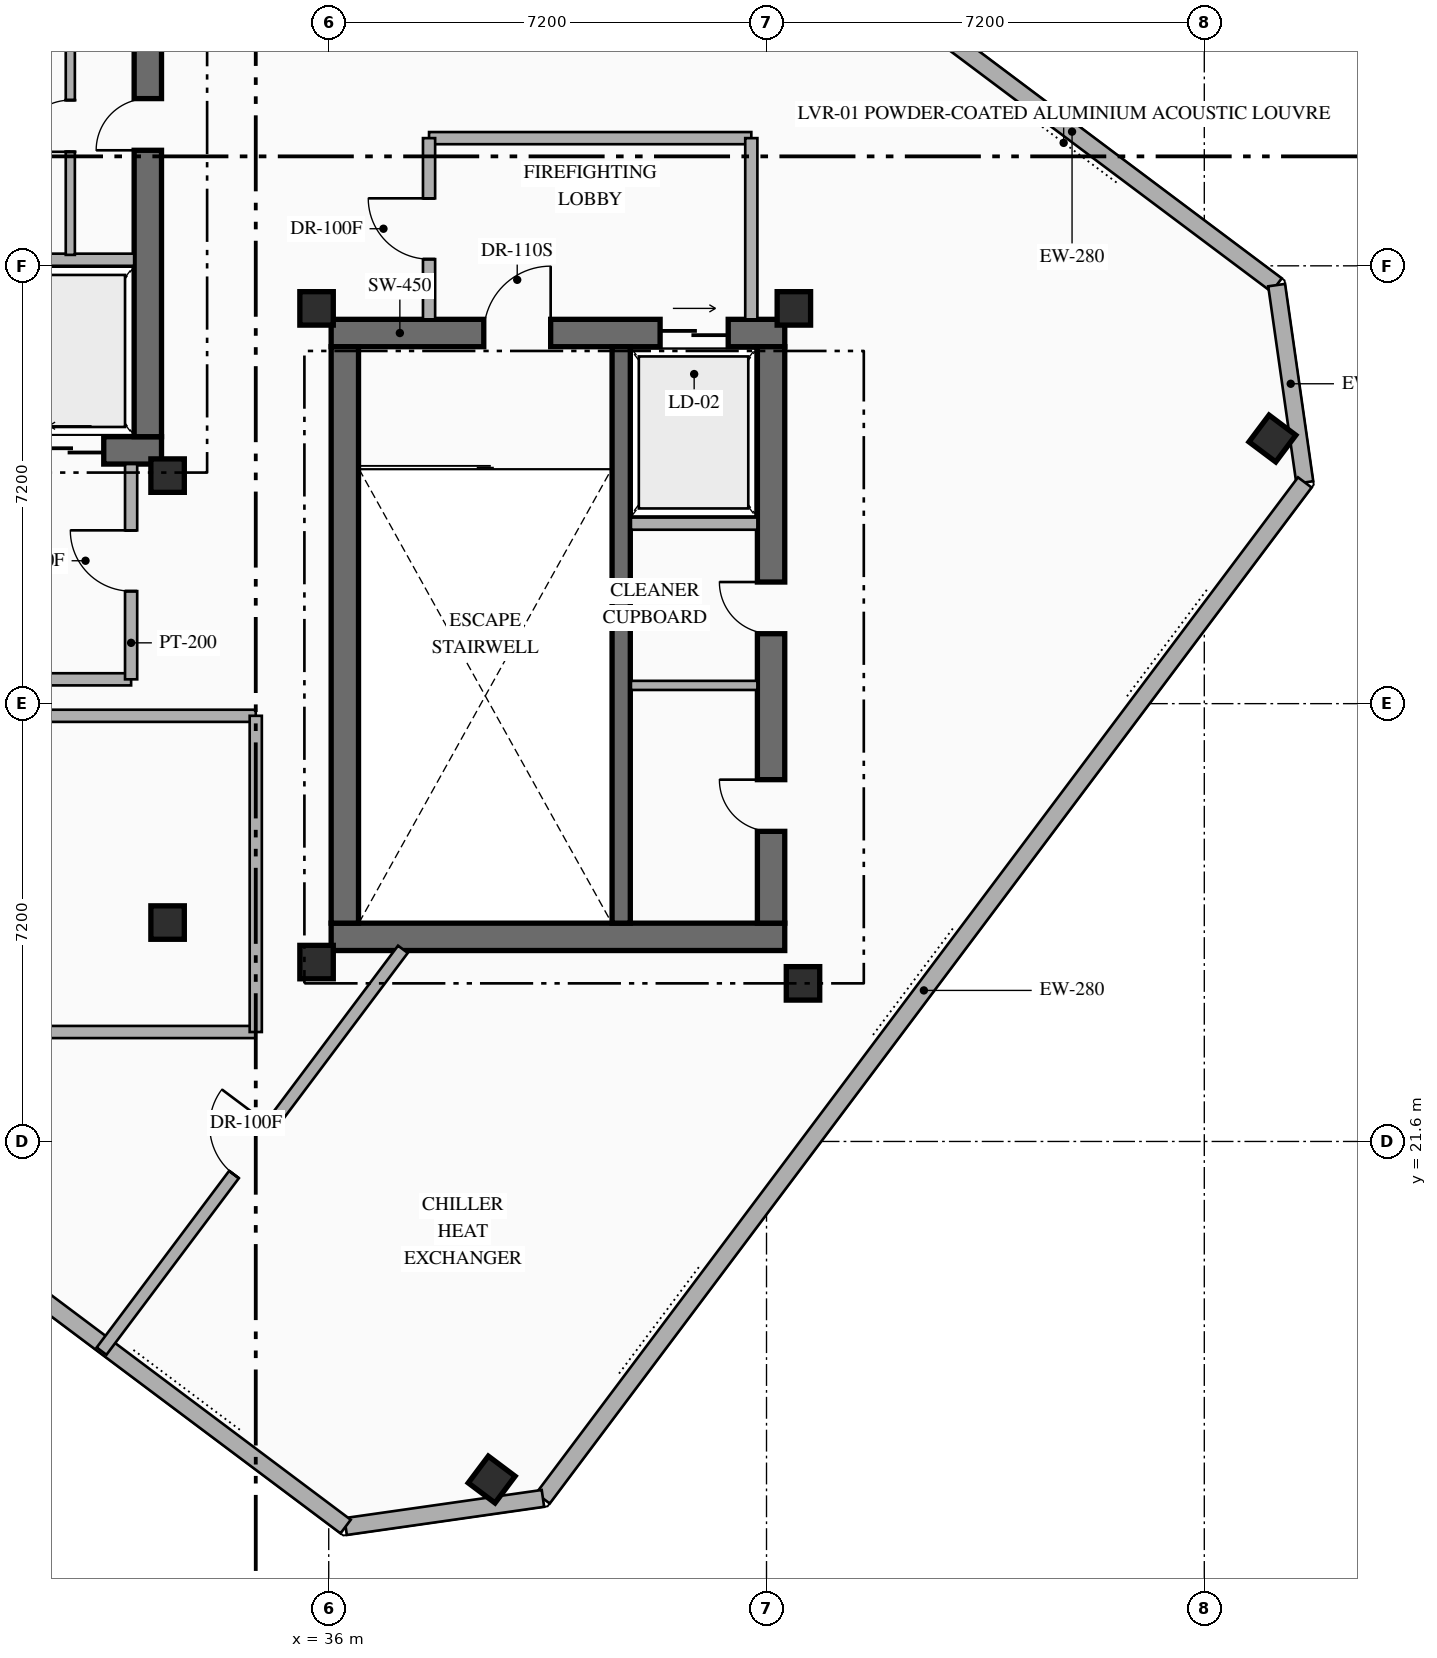
"""IFC4 building model, lengths in metres.
Left out: names, types, materials, properties, quantities, classifications, styles, units other than length and angle.
Written with IfcOpenShell. Run it as: python <this file> out.ifc"""

import sys

from ifc_helpers import new_model, si_unit, direction, frame, frame_2d, origin, origin_2d, place, context, subcontext, project, spatial, rectangle, hollow_rectangle, extrude, element, fill, save


model = new_model("IFC4")
c1 = context("Model", 3, precision=1e-05, world=origin(), true_north=direction((0.0, 1.0)))
c2 = subcontext(c1, "Body", "Model", "MODEL_VIEW")
j1 = project(units=[si_unit("LENGTHUNIT", "METRE"), si_unit("PLANEANGLEUNIT", "RADIAN")], contexts=[c1])
p1 = place(None, origin())
s1 = spatial("IfcSite", under=j1, at=p1, CompositionType="ELEMENT")
p2 = place(p1, origin())
s2 = spatial("IfcBuilding", under=s1, at=p2, CompositionType="ELEMENT")
p3 = place(p2, frame((0.0, 0.0, 289.95)))
s3 = spatial("IfcBuildingStorey", under=s2, at=p3, CompositionType="ELEMENT", Elevation=289.95)
p4 = place(p3, frame((25.77, 32.965, 0.0), z_axis=(0.0, 0.0, 1.0), x_axis=(1.0, 0.0, 0.0)))
e1 = element("IfcWall", 1, at=p4, inside=s3, PredefinedType="SHEAR", context=c2, shape_type="SweptSolid", body=[
    extrude(rectangle(XDim=7.48, YDim=0.45, at=frame_2d((3.74, 0.0))), origin(), (0.0, 0.0, 1.0), 4.2),
])
p5 = place(p4, frame((2.68, 0.0, 0.0)))
e2 = element("IfcOpeningElement", 2, at=p5, cuts=e1, PredefinedType="OPENING", context=c2, shape_type="SweptSolid", body=[
    extrude(rectangle(XDim=1.1, YDim=2.2, at=frame_2d((0.55, 1.1))), frame((0.0, 0.235, 0.0), z_axis=(0.0, -1.0, 0.0), x_axis=(1.0, 0.0, 0.0)), (0.0, 0.0, 1.0), 0.47),
])
p6 = place(p4, frame((5.43, 0.0, 0.0)))
e3 = element("IfcOpeningElement", 3, at=p6, cuts=e1, PredefinedType="OPENING", context=c2, shape_type="SweptSolid", body=[
    extrude(rectangle(XDim=1.1, YDim=2.15, at=frame_2d((0.55, 1.075))), frame((0.0, 0.235, 0.0), z_axis=(0.0, -1.0, 0.0), x_axis=(1.0, 0.0, 0.0)), (0.0, 0.0, 1.0), 0.47),
])
p7 = place(p3, frame((33.025, 33.19, 0.0), z_axis=(0.0, 0.0, 1.0), x_axis=(0.0, 1.0, 0.0)))
e4 = element("IfcWall", 4, at=p7, inside=s3, PredefinedType="SHEAR", context=c2, shape_type="SweptSolid", body=[
    extrude(rectangle(XDim=9.48, YDim=0.45, at=frame_2d((4.74, 0.0))), origin(), (0.0, 0.0, 1.0), 4.2),
])
p8 = place(p7, frame((4.71, 0.0, 0.0)))
e5 = element("IfcOpeningElement", 5, at=p8, cuts=e4, PredefinedType="OPENING", context=c2, shape_type="SweptSolid", body=[
    extrude(rectangle(XDim=0.85, YDim=2.08, at=frame_2d((0.425, 1.04))), frame((0.0, 0.235, 0.0), z_axis=(0.0, -1.0, 0.0), x_axis=(1.0, 0.0, 0.0)), (0.0, 0.0, 1.0), 0.47),
])
p9 = place(p7, frame((7.76, 0.0, 0.0)))
e6 = element("IfcOpeningElement", 6, at=p9, cuts=e4, PredefinedType="OPENING", context=c2, shape_type="SweptSolid", body=[
    extrude(rectangle(XDim=0.85, YDim=2.08, at=frame_2d((0.425, 1.04))), frame((0.0, 0.235, 0.0), z_axis=(0.0, -1.0, 0.0), x_axis=(1.0, 0.0, 0.0)), (0.0, 0.0, 1.0), 0.47),
])
p10 = place(p3, frame((36.04, 24.965, 0.0), z_axis=(0.0, 0.0, 1.0), x_axis=(1.0, 0.0, 0.0)))
e7 = element("IfcWall", 7, at=p10, inside=s3, PredefinedType="SHEAR", context=c2, shape_type="SweptSolid", body=[
    extrude(rectangle(XDim=7.46, YDim=0.45, at=frame_2d((3.73, 0.0))), origin(), (0.0, 0.0, 1.0), 4.2),
])
p11 = place(p3, frame((36.04, 34.895, 0.0), z_axis=(0.0, 0.0, 1.0), x_axis=(1.0, 0.0, 0.0)))
e8 = element("IfcWall", 8, at=p11, inside=s3, PredefinedType="SHEAR", context=c2, shape_type="SweptSolid", body=[
    extrude(rectangle(XDim=7.46, YDim=0.45, at=frame_2d((3.73, 0.0))), origin(), (0.0, 0.0, 1.0), 4.2),
])
p12 = place(p11, frame((2.51, 0.0, 0.0)))
e9 = element("IfcOpeningElement", 9, at=p12, cuts=e8, PredefinedType="OPENING", context=c2, shape_type="SweptSolid", body=[
    extrude(rectangle(XDim=1.1, YDim=2.2, at=frame_2d((0.55, 1.1))), frame((0.0, 0.235, 0.0), z_axis=(0.0, -1.0, 0.0), x_axis=(1.0, 0.0, 0.0)), (0.0, 0.0, 1.0), 0.47),
])
p13 = place(p11, frame((5.41, 0.0, 0.0)))
e10 = element("IfcOpeningElement", 10, at=p13, cuts=e8, PredefinedType="OPENING", context=c2, shape_type="SweptSolid", body=[
    extrude(rectangle(XDim=1.12, YDim=2.15, at=frame_2d((0.56, 1.075))), frame((0.0, 0.235, 0.0), z_axis=(0.0, -1.0, 0.0), x_axis=(1.0, 0.0, 0.0)), (0.0, 0.0, 1.0), 0.47),
])
p14 = place(p3, frame((36.265, 25.19, 0.0), z_axis=(0.0, 0.0, 1.0), x_axis=(0.0, 1.0, 0.0)))
e11 = element("IfcWall", 11, at=p14, inside=s3, PredefinedType="SHEAR", context=c2, shape_type="SweptSolid", body=[
    extrude(rectangle(XDim=9.48, YDim=0.45, at=frame_2d((4.74, 0.0))), origin(), (0.0, 0.0, 1.0), 4.2),
])
p15 = place(p3, frame((43.275, 25.19, 0.0), z_axis=(0.0, 0.0, 1.0), x_axis=(0.0, 1.0, 0.0)))
e12 = element("IfcWall", 12, at=p15, inside=s3, PredefinedType="SHEAR", context=c2, shape_type="SweptSolid", body=[
    extrude(rectangle(XDim=9.48, YDim=0.45, at=frame_2d((4.74, 0.0))), origin(), (0.0, 0.0, 1.0), 4.2),
])
p16 = place(p15, frame((1.51, 0.0, 0.0)))
e13 = element("IfcOpeningElement", 13, at=p16, cuts=e12, PredefinedType="OPENING", context=c2, shape_type="SweptSolid", body=[
    extrude(rectangle(XDim=0.85, YDim=2.08, at=frame_2d((0.425, 1.04))), frame((0.0, 0.235, 0.0), z_axis=(0.0, -1.0, 0.0), x_axis=(1.0, 0.0, 0.0)), (0.0, 0.0, 1.0), 0.47),
])
p17 = place(p15, frame((4.76, 0.0, 0.0)))
e14 = element("IfcOpeningElement", 14, at=p17, cuts=e12, PredefinedType="OPENING", context=c2, shape_type="SweptSolid", body=[
    extrude(rectangle(XDim=0.85, YDim=2.08, at=frame_2d((0.425, 1.04))), frame((0.0, 0.235, 0.0), z_axis=(0.0, -1.0, 0.0), x_axis=(1.0, 0.0, 0.0)), (0.0, 0.0, 1.0), 0.47),
])
p18 = place(p3, frame((40.81, 25.19, 0.0), z_axis=(0.0, 0.0, 1.0), x_axis=(0.0, 1.0, 0.0)))
e15 = element("IfcWall", 15, at=p18, inside=s3, PredefinedType="SHEAR", context=c2, shape_type="SweptSolid", body=[
    extrude(rectangle(XDim=9.48, YDim=0.3, at=frame_2d((4.74, 0.0))), origin(), (0.0, 0.0, 1.0), 4.2),
])
for number, where, z_axis, x_axis in (
    (16, (33.35, 32.55, 0.0), (0.0, 0.0, 1.0), (1.0, 0.0, 0.0)),
    (17, (35.8, 24.55, 0.0), (0.0, 0.0, 1.0), (1.0, 0.0, 0.0)),
    (18, (43.8, 24.2, 0.0), (0.0, 0.0, 1.0), (1.0, 0.0, 0.0)),
    (19, (35.8, 35.3, 0.0), (0.0, 0.0, 1.0), (1.0, 0.0, 0.0)),
    (20, (43.65, 35.3, 0.0), (0.0, 0.0, 1.0), (1.0, 0.0, 0.0)),
    (21, (33.35, 25.2, 0.0), (0.0, 0.0, 1.0), (1.0, 0.0, 0.0)),
    (22, (38.68, 16.04, 0.0), (0.0, 0.0, 1.0), (0.8, -0.6, 0.0)),
    (23, (51.52, 33.16, 0.0), (0.0, 0.0, 1.0), (0.8, -0.6, 0.0)),
):
    element("IfcColumn", number, at=place(p3, frame(where, z_axis=z_axis, x_axis=x_axis)), inside=s3, PredefinedType="COLUMN", context=c2, shape_type="SweptSolid", body=[
        extrude(hollow_rectangle(XDim=0.55, YDim=0.55, WallThickness=0.022, at=origin_2d()), origin(), (0.0, 0.0, 1.0), 3.818),
    ])
p19 = place(p3, frame((44.86, 40.73, 0.0), z_axis=(0.0, 0.0, 1.0), x_axis=(0.800034825678, -0.599953562955, 0.0)))
e24 = element("IfcWall", 24, at=p19, inside=s3, PredefinedType="STANDARD", context=c2, shape_type="SweptSolid", body=[
    extrude(rectangle(XDim=8.412, YDim=0.28, at=frame_2d((4.206, 0.0))), origin(), (0.0, 0.0, 1.0), 3.85),
])
p20 = place(p3, frame((51.59, 35.683, 0.0), z_axis=(0.0, 0.0, 1.0), x_axis=(0.141212810973, -0.989979263428, 0.0)))
e25 = element("IfcWall", 25, at=p20, inside=s3, PredefinedType="STANDARD", context=c2, shape_type="SweptSolid", body=[
    extrude(rectangle(XDim=3.278, YDim=0.28, at=frame_2d((1.639, 0.0))), origin(), (0.0, 0.0, 1.0), 3.85),
])
p21 = place(p3, frame((52.053, 32.438, 0.0), z_axis=(0.0, 0.0, 1.0), x_axis=(-0.599970072971, -0.800022444397, 0.0)))
e26 = element("IfcWall", 26, at=p21, inside=s3, PredefinedType="STANDARD", context=c2, shape_type="SweptSolid", body=[
    extrude(rectangle(XDim=20.885, YDim=0.28, at=frame_2d((10.442, 0.0))), origin(), (0.0, 0.0, 1.0), 3.85),
])
p22 = place(p3, frame((39.523, 15.73, 0.0), z_axis=(0.0, 0.0, 1.0), x_axis=(-0.989977778067, -0.141223223777, 0.0)))
e27 = element("IfcWall", 27, at=p22, inside=s3, PredefinedType="STANDARD", context=c2, shape_type="SweptSolid", body=[
    extrude(rectangle(XDim=3.278, YDim=0.28, at=frame_2d((1.639, 0.0))), origin(), (0.0, 0.0, 1.0), 3.85),
])
p23 = place(p3, frame((36.278, 15.267, 0.0), z_axis=(0.0, 0.0, 1.0), x_axis=(-0.80001062348, 0.599985835098, 0.0)))
e28 = element("IfcWall", 28, at=p23, inside=s3, PredefinedType="STANDARD", context=c2, shape_type="SweptSolid", body=[
    extrude(rectangle(XDim=13.789, YDim=0.28, at=frame_2d((6.894, 0.0))), origin(), (0.0, 0.0, 1.0), 3.85),
])
p24 = place(p3, frame((30.7, 36.1, 0.0), z_axis=(0.0, 0.0, 1.0), x_axis=(1.0, 0.0, 0.0)))
e29 = element("IfcWall", 29, at=p24, inside=s3, PredefinedType="STANDARD", context=c2, shape_type="SweptSolid", body=[
    extrude(rectangle(XDim=2.1, YDim=0.2, at=frame_2d((1.05, 0.0))), origin(), (0.0, 0.0, 1.0), 3.85),
])
p25 = place(p3, frame((31.75, 36.18, 0.0), z_axis=(0.0, 0.0, 1.0), x_axis=(0.0, 1.0, 0.0)))
e30 = element("IfcWall", 30, at=p25, inside=s3, PredefinedType="PARTITIONING", context=c2, shape_type="SweptSolid", body=[
    extrude(rectangle(XDim=4.24, YDim=0.15, at=frame_2d((2.12, 0.0))), origin(), (0.0, 0.0, 1.0), 3.85),
])
p26 = place(p25, frame((1.695, 0.0, 0.0)))
e31 = element("IfcOpeningElement", 31, at=p26, cuts=e30, PredefinedType="OPENING", context=c2, shape_type="SweptSolid", body=[
    extrude(rectangle(XDim=0.85, YDim=2.08, at=frame_2d((0.425, 1.04))), frame((0.0, 0.085, 0.0), z_axis=(0.0, -1.0, 0.0), x_axis=(1.0, 0.0, 0.0)), (0.0, 0.0, 1.0), 0.17),
])
p27 = place(p3, frame((40.97, 31.76, 0.0), z_axis=(0.0, 0.0, 1.0), x_axis=(1.0, 0.0, 0.0)))
e32 = element("IfcWall", 32, at=p27, inside=s3, PredefinedType="STANDARD", context=c2, shape_type="SweptSolid", body=[
    extrude(rectangle(XDim=2.08, YDim=0.2, at=frame_2d((1.04, 0.0))), origin(), (0.0, 0.0, 1.0), 3.85),
])
p28 = place(p3, frame((40.97, 29.1, 0.0), z_axis=(0.0, 0.0, 1.0), x_axis=(1.0, 0.0, 0.0)))
e33 = element("IfcWall", 33, at=p28, inside=s3, PredefinedType="PARTITIONING", context=c2, shape_type="SweptSolid", body=[
    extrude(rectangle(XDim=2.08, YDim=0.15, at=frame_2d((1.04, 0.0))), origin(), (0.0, 0.0, 1.0), 3.85),
])
p29 = place(p3, frame((27.6, 29.2, 0.0), z_axis=(0.0, 0.0, 1.0), x_axis=(1.0, 0.0, 0.0)))
e34 = element("IfcWall", 34, at=p29, inside=s3, PredefinedType="STANDARD", context=c2, shape_type="SweptSolid", body=[
    extrude(rectangle(XDim=5.15, YDim=0.2, at=frame_2d((2.575, 0.0))), origin(), (0.0, 0.0, 1.0), 3.85),
])
p30 = place(p3, frame((32.75, 29.2, 0.0), z_axis=(0.0, 0.0, 1.0), x_axis=(0.0, 1.0, 0.0)))
e35 = element("IfcWall", 35, at=p30, inside=s3, PredefinedType="STANDARD", context=c2, shape_type="SweptSolid", body=[
    extrude(rectangle(XDim=3.54, YDim=0.2, at=frame_2d((1.77, 0.0))), origin(), (0.0, 0.0, 1.0), 3.85),
])
p31 = place(p30, frame((1.45, 0.0, 0.0)))
e36 = element("IfcOpeningElement", 36, at=p31, cuts=e35, PredefinedType="OPENING", context=c2, shape_type="SweptSolid", body=[
    extrude(rectangle(XDim=1.0, YDim=2.2, at=frame_2d((0.5, 1.1))), frame((0.0, 0.11, 0.0), z_axis=(0.0, -1.0, 0.0), x_axis=(1.0, 0.0, 0.0)), (0.0, 0.0, 1.0), 0.22),
])
p32 = place(p3, frame((37.65, 38.1, 0.0), z_axis=(0.0, 0.0, 1.0), x_axis=(1.0, 0.0, 0.0)))
e37 = element("IfcWall", 37, at=p32, inside=s3, PredefinedType="STANDARD", context=c2, shape_type="SweptSolid", body=[
    extrude(rectangle(XDim=5.3, YDim=0.2, at=frame_2d((2.65, 0.0))), origin(), (0.0, 0.0, 1.0), 3.85),
])
p33 = place(p3, frame((42.95, 35.12, 0.0), z_axis=(0.0, 0.0, 1.0), x_axis=(0.0, 1.0, 0.0)))
e38 = element("IfcWall", 38, at=p33, inside=s3, PredefinedType="STANDARD", context=c2, shape_type="SweptSolid", body=[
    extrude(rectangle(XDim=2.98, YDim=0.2, at=frame_2d((1.49, 0.0))), origin(), (0.0, 0.0, 1.0), 3.85),
])
p34 = place(p3, frame((37.65, 35.12, 0.0), z_axis=(0.0, 0.0, 1.0), x_axis=(0.0, 1.0, 0.0)))
e39 = element("IfcWall", 39, at=p34, inside=s3, PredefinedType="STANDARD", context=c2, shape_type="SweptSolid", body=[
    extrude(rectangle(XDim=2.98, YDim=0.2, at=frame_2d((1.49, 0.0))), origin(), (0.0, 0.0, 1.0), 3.85),
])
p35 = place(p34, frame((0.99, 0.0, 0.0)))
e40 = element("IfcOpeningElement", 40, at=p35, cuts=e39, PredefinedType="OPENING", context=c2, shape_type="SweptSolid", body=[
    extrude(rectangle(XDim=1.0, YDim=2.2, at=frame_2d((0.5, 1.1))), frame((0.0, 0.11, 0.0), z_axis=(0.0, -1.0, 0.0), x_axis=(1.0, 0.0, 0.0)), (0.0, 0.0, 1.0), 0.22),
])
p36 = place(p3, frame((25.267, 23.4, 0.0), z_axis=(0.0, 0.0, 1.0), x_axis=(1.0, 0.0, 0.0)))
e41 = element("IfcWall", 41, at=p36, inside=s3, PredefinedType="STANDARD", context=c2, shape_type="SweptSolid", body=[
    extrude(rectangle(XDim=9.533, YDim=0.2, at=frame_2d((4.767, 0.0))), origin(), (0.0, 0.0, 1.0), 3.85),
])
p37 = place(p3, frame((20.44, 28.6, 0.0), z_axis=(0.0, 0.0, 1.0), x_axis=(1.0, 0.0, 0.0)))
e42 = element("IfcWall", 42, at=p37, inside=s3, PredefinedType="STANDARD", context=c2, shape_type="SweptSolid", body=[
    extrude(rectangle(XDim=14.36, YDim=0.2, at=frame_2d((7.18, 0.0))), origin(), (0.0, 0.0, 1.0), 3.85),
])
p38 = place(p37, frame((5.42, 0.0, 0.0)))
e43 = element("IfcOpeningElement", 43, at=p38, cuts=e42, PredefinedType="OPENING", context=c2, shape_type="SweptSolid", body=[
    extrude(rectangle(XDim=1.0, YDim=2.2, at=frame_2d((0.5, 1.1))), frame((0.0, 0.11, 0.0), z_axis=(0.0, -1.0, 0.0), x_axis=(1.0, 0.0, 0.0)), (0.0, 0.0, 1.0), 0.22),
])
p39 = place(p3, frame((34.8, 23.4, 0.0), z_axis=(0.0, 0.0, 1.0), x_axis=(0.0, 1.0, 0.0)))
e44 = element("IfcWall", 44, at=p39, inside=s3, PredefinedType="STANDARD", context=c2, shape_type="SweptSolid", body=[
    extrude(rectangle(XDim=5.2, YDim=0.2, at=frame_2d((2.6, 0.0))), origin(), (0.0, 0.0, 1.0), 3.85),
])
p40 = place(p3, frame((32.264, 18.152, 0.0), z_axis=(0.0, 0.0, 1.0), x_axis=(0.600009458235, 0.799992906236, 0.0)))
e45 = element("IfcWall", 45, at=p40, inside=s3, PredefinedType="STANDARD", context=c2, shape_type="SweptSolid", body=[
    extrude(rectangle(XDim=8.26, YDim=0.2, at=frame_2d((4.13, 0.0))), origin(), (0.0, 0.0, 1.0), 3.85),
])
p41 = place(p40, frame((3.63, 0.0, 0.0)))
e46 = element("IfcOpeningElement", 46, at=p41, cuts=e45, PredefinedType="OPENING", context=c2, shape_type="SweptSolid", body=[
    extrude(rectangle(XDim=1.0, YDim=2.2, at=frame_2d((0.5, 1.1))), frame((0.0, 0.11, 0.0), z_axis=(0.0, -1.0, 0.0), x_axis=(1.0, 0.0, 0.0)), (0.0, 0.0, 1.0), 0.22),
])
p42 = place(p6, origin())
e47 = element("IfcDoor", 47, at=p42, inside=s3, OperationType="SLIDING_TO_LEFT", PredefinedType="USERDEFINED", context=c2, shape_type="SweptSolid", body=[
    extrude(rectangle(XDim=1.1, YDim=2.15, at=frame_2d((0.55, 1.075))), frame((0.0, 0.025, 0.0), z_axis=(0.0, -1.0, 0.0), x_axis=(1.0, 0.0, 0.0)), (0.0, 0.0, 1.0), 0.05),
])
fill(e3, e47)
p43 = place(p12, origin())
e48 = element("IfcDoor", 48, at=p43, inside=s3, OperationType="SINGLE_SWING_RIGHT", PredefinedType="DOOR", context=c2, shape_type="SweptSolid", body=[
    extrude(rectangle(XDim=1.1, YDim=2.2, at=frame_2d((0.55, 1.1))), frame((0.0, 0.025, 0.0), z_axis=(0.0, -1.0, 0.0), x_axis=(1.0, 0.0, 0.0)), (0.0, 0.0, 1.0), 0.05),
])
fill(e9, e48)
p44 = place(p13, origin())
e49 = element("IfcDoor", 49, at=p44, inside=s3, OperationType="SLIDING_TO_RIGHT", PredefinedType="USERDEFINED", context=c2, shape_type="SweptSolid", body=[
    extrude(rectangle(XDim=1.12, YDim=2.15, at=frame_2d((0.56, 1.075))), frame((0.0, 0.025, 0.0), z_axis=(0.0, -1.0, 0.0), x_axis=(1.0, 0.0, 0.0)), (0.0, 0.0, 1.0), 0.05),
])
fill(e10, e49)
p45 = place(p8, origin())
e50 = element("IfcDoor", 50, at=p45, inside=s3, OperationType="SINGLE_SWING_LEFT", PredefinedType="DOOR", context=c2, shape_type="SweptSolid", body=[
    extrude(rectangle(XDim=0.85, YDim=2.08, at=frame_2d((0.425, 1.04))), frame((0.0, 0.025, 0.0), z_axis=(0.0, -1.0, 0.0), x_axis=(1.0, 0.0, 0.0)), (0.0, 0.0, 1.0), 0.05),
])
fill(e5, e50)
p46 = place(p16, origin())
e51 = element("IfcDoor", 51, at=p46, inside=s3, OperationType="SINGLE_SWING_RIGHT", PredefinedType="DOOR", context=c2, shape_type="SweptSolid", body=[
    extrude(rectangle(XDim=0.85, YDim=2.08, at=frame_2d((0.425, 1.04))), frame((0.0, 0.025, 0.0), z_axis=(0.0, -1.0, 0.0), x_axis=(1.0, 0.0, 0.0)), (0.0, 0.0, 1.0), 0.05),
])
fill(e13, e51)
p47 = place(p17, origin())
e52 = element("IfcDoor", 52, at=p47, inside=s3, OperationType="SINGLE_SWING_RIGHT", PredefinedType="DOOR", context=c2, shape_type="SweptSolid", body=[
    extrude(rectangle(XDim=0.85, YDim=2.08, at=frame_2d((0.425, 1.04))), frame((0.0, 0.025, 0.0), z_axis=(0.0, -1.0, 0.0), x_axis=(1.0, 0.0, 0.0)), (0.0, 0.0, 1.0), 0.05),
])
fill(e14, e52)
p48 = place(p26, origin())
e53 = element("IfcDoor", 53, at=p48, inside=s3, OperationType="SINGLE_SWING_LEFT", PredefinedType="DOOR", context=c2, shape_type="SweptSolid", body=[
    extrude(rectangle(XDim=0.85, YDim=2.08, at=frame_2d((0.425, 1.04))), frame((0.0, 0.025, 0.0), z_axis=(0.0, -1.0, 0.0), x_axis=(1.0, 0.0, 0.0)), (0.0, 0.0, 1.0), 0.05),
])
fill(e31, e53)
p49 = place(p31, origin())
e54 = element("IfcDoor", 54, at=p49, inside=s3, OperationType="SINGLE_SWING_RIGHT", PredefinedType="DOOR", context=c2, shape_type="SweptSolid", body=[
    extrude(rectangle(XDim=1.0, YDim=2.2, at=frame_2d((0.5, 1.1))), frame((0.0, 0.025, 0.0), z_axis=(0.0, -1.0, 0.0), x_axis=(1.0, 0.0, 0.0)), (0.0, 0.0, 1.0), 0.05),
])
fill(e36, e54)
p50 = place(p35, origin())
e55 = element("IfcDoor", 55, at=p50, inside=s3, OperationType="SINGLE_SWING_RIGHT", PredefinedType="DOOR", context=c2, shape_type="SweptSolid", body=[
    extrude(rectangle(XDim=1.0, YDim=2.2, at=frame_2d((0.5, 1.1))), frame((0.0, 0.025, 0.0), z_axis=(0.0, -1.0, 0.0), x_axis=(1.0, 0.0, 0.0)), (0.0, 0.0, 1.0), 0.05),
])
fill(e40, e55)
p51 = place(p41, origin())
e56 = element("IfcDoor", 56, at=p51, inside=s3, OperationType="SINGLE_SWING_RIGHT", PredefinedType="DOOR", context=c2, shape_type="SweptSolid", body=[
    extrude(rectangle(XDim=1.0, YDim=2.2, at=frame_2d((0.5, 1.1))), frame((0.0, 0.025, 0.0), z_axis=(0.0, -1.0, 0.0), x_axis=(1.0, 0.0, 0.0)), (0.0, 0.0, 1.0), 0.05),
])
fill(e46, e56)
save(model, sys.argv[1])
